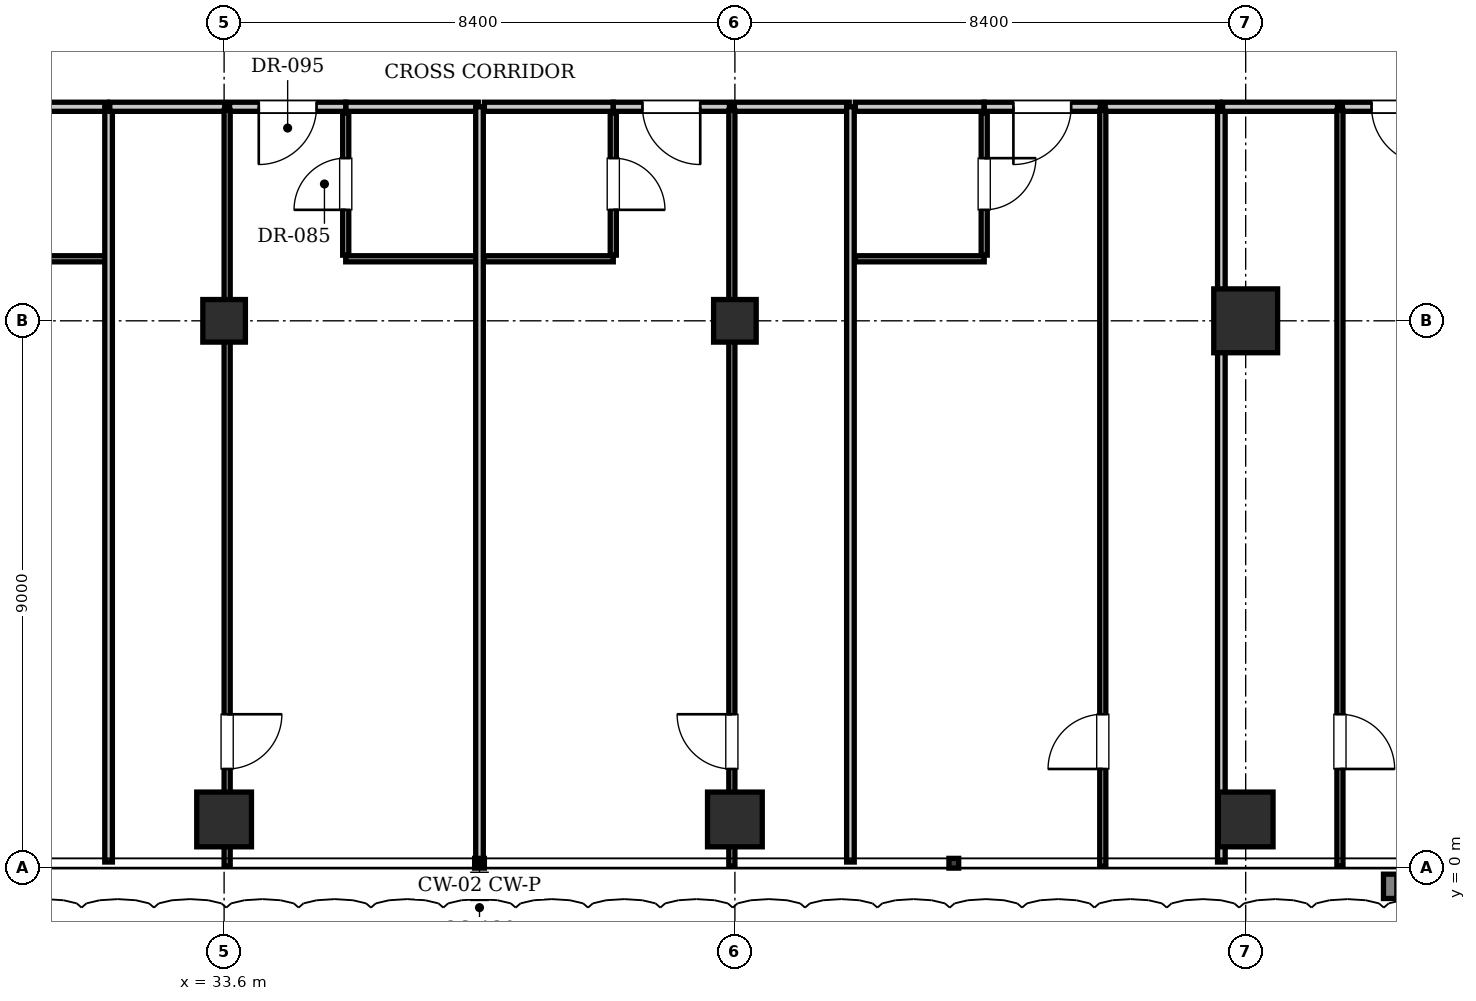
"""IFC4 building model, lengths in metres.
Left out: names, types, materials, properties, quantities, classifications, styles, units other than length and angle.
Written with IfcOpenShell. Run it as: python <this file> out.ifc"""

import sys

from ifc_helpers import new_model, si_unit, direction, frame, frame_2d, origin, origin_2d, place, context, subcontext, project, spatial, rectangle, i_section, extrude, element, fill, save


model = new_model("IFC4")
c1 = context("Model", 3, precision=1e-05, world=origin(), true_north=direction((0.0, 1.0)))
c2 = subcontext(c1, "Body", "Model", "MODEL_VIEW")
j1 = project(units=[si_unit("LENGTHUNIT", "METRE"), si_unit("PLANEANGLEUNIT", "RADIAN")], contexts=[c1])
p1 = place(None, origin())
s1 = spatial("IfcSite", under=j1, at=p1, CompositionType="ELEMENT")
p2 = place(p1, origin())
s2 = spatial("IfcBuilding", under=s1, at=p2, CompositionType="ELEMENT")
p3 = place(p2, frame((0.0, 0.0, 38.5)))
s3 = spatial("IfcBuildingStorey", under=s2, at=p3, CompositionType="ELEMENT", Elevation=38.5)
p4 = place(p3, frame((50.4, 9.0, 0.0), z_axis=(0.0, 0.0, 1.0), x_axis=(1.0, 0.0, 0.0)))
e1 = element("IfcColumn", 1, at=p4, inside=s3, PredefinedType="COLUMN", context=c2, shape_type="SweptSolid", body=[
    extrude(rectangle(XDim=1.05, YDim=1.05, at=origin_2d()), origin(), (0.0, 0.0, 1.0), 3.85),
])
for number, where, z_axis, x_axis in (
    (2, (33.6, 9.0, 0.0), (0.0, 0.0, 1.0), (1.0, 0.0, 0.0)),
    (3, (42.0, 9.0, 0.0), (0.0, 0.0, 1.0), (1.0, 0.0, 0.0)),
):
    element("IfcColumn", number, at=place(p3, frame(where, z_axis=z_axis, x_axis=x_axis)), inside=s3, PredefinedType="COLUMN", context=c2, shape_type="SweptSolid", body=[
        extrude(i_section(OverallWidth=0.7, OverallDepth=0.7, WebThickness=0.028, FlangeThickness=0.044, at=origin_2d()), origin(), (0.0, 0.0, 1.0), 3.85),
    ])
for number, where, z_axis, x_axis in (
    (4, (33.6, 0.8, 0.0), (0.0, 0.0, 1.0), (1.0, 0.0, 0.0)),
    (5, (42.0, 0.8, 0.0), (0.0, 0.0, 1.0), (1.0, 0.0, 0.0)),
    (6, (50.4, 0.8, 0.0), (0.0, 0.0, 1.0), (1.0, 0.0, 0.0)),
):
    element("IfcColumn", number, at=place(p3, frame(where, z_axis=z_axis, x_axis=x_axis)), inside=s3, PredefinedType="COLUMN", context=c2, shape_type="SweptSolid", body=[
        extrude(rectangle(XDim=0.9, YDim=0.9, at=origin_2d()), origin(), (0.0, 0.0, 1.0), 3.85),
    ])
p5 = place(p3, frame((29.5, 12.52, 0.0), z_axis=(0.0, 0.0, 1.0), x_axis=(1.0, 0.0, 0.0)))
e7 = element("IfcWall", 7, at=p5, inside=s3, PredefinedType="PARTITIONING", context=c2, shape_type="SweptSolid", body=[
    extrude(rectangle(XDim=2.18, YDim=0.15, at=frame_2d((1.09, 0.0))), origin(), (0.0, 0.0, 1.0), 3.61),
])
p6 = place(p3, frame((29.5, 10.02, 0.0), z_axis=(0.0, 0.0, 1.0), x_axis=(1.0, 0.0, 0.0)))
e8 = element("IfcWall", 8, at=p6, inside=s3, PredefinedType="PARTITIONING", context=c2, shape_type="SweptSolid", body=[
    extrude(rectangle(XDim=2.16, YDim=0.1, at=frame_2d((1.08, 0.0))), origin(), (0.0, 0.0, 1.0), 3.61),
])
p7 = place(p3, frame((31.7, 0.1, 0.0), z_axis=(0.0, 0.0, 1.0), x_axis=(0.0, 1.0, 0.0)))
e9 = element("IfcWall", 9, at=p7, inside=s3, PredefinedType="PARTITIONING", context=c2, shape_type="SweptSolid", body=[
    extrude(rectangle(XDim=12.42, YDim=0.125, at=frame_2d((6.21, 0.0))), origin(), (0.0, 0.0, 1.0), 3.61),
])
p8 = place(p3, frame((35.6, 12.52, 0.0), z_axis=(0.0, 0.0, 1.0), x_axis=(1.0, 0.0, 0.0)))
e10 = element("IfcWall", 10, at=p8, inside=s3, PredefinedType="PARTITIONING", context=c2, shape_type="SweptSolid", body=[
    extrude(rectangle(XDim=2.18, YDim=0.15, at=frame_2d((1.09, 0.0))), origin(), (0.0, 0.0, 1.0), 3.61),
])
p9 = place(p3, frame((35.6, 10.02, 0.0), z_axis=(0.0, 0.0, 1.0), x_axis=(1.0, 0.0, 0.0)))
e11 = element("IfcWall", 11, at=p9, inside=s3, PredefinedType="PARTITIONING", context=c2, shape_type="SweptSolid", body=[
    extrude(rectangle(XDim=2.16, YDim=0.1, at=frame_2d((1.08, 0.0))), origin(), (0.0, 0.0, 1.0), 3.61),
])
p10 = place(p3, frame((35.6, 10.08, 0.0), z_axis=(0.0, 0.0, 1.0), x_axis=(0.0, 1.0, 0.0)))
e12 = element("IfcWall", 12, at=p10, inside=s3, PredefinedType="PARTITIONING", context=c2, shape_type="SweptSolid", body=[
    extrude(rectangle(XDim=2.34, YDim=0.1, at=frame_2d((1.17, 0.0))), origin(), (0.0, 0.0, 1.0), 3.61),
])
p11 = place(p10, frame((0.745, 0.0, 0.0)))
e13 = element("IfcOpeningElement", 13, at=p11, cuts=e12, PredefinedType="OPENING", context=c2, shape_type="SweptSolid", body=[
    extrude(rectangle(XDim=0.85, YDim=2.1, at=frame_2d((0.425, 1.05))), frame((0.0, 0.06, 0.0), z_axis=(0.0, -1.0, 0.0), x_axis=(1.0, 0.0, 0.0)), (0.0, 0.0, 1.0), 0.12),
])
p12 = place(p3, frame((31.72, 12.52, 0.0), z_axis=(0.0, 0.0, 1.0), x_axis=(1.0, 0.0, 0.0)))
e14 = element("IfcWall", 14, at=p12, inside=s3, PredefinedType="PARTITIONING", context=c2, shape_type="SweptSolid", body=[
    extrude(rectangle(XDim=1.89, YDim=0.15, at=frame_2d((0.945, 0.0))), origin(), (0.0, 0.0, 1.0), 3.61),
])
p13 = place(p3, frame((33.69, 12.52, 0.0), z_axis=(0.0, 0.0, 1.0), x_axis=(1.0, 0.0, 0.0)))
e15 = element("IfcWall", 15, at=p13, inside=s3, PredefinedType="PARTITIONING", context=c2, shape_type="SweptSolid", body=[
    extrude(rectangle(XDim=1.91, YDim=0.15, at=frame_2d((0.955, 0.0))), origin(), (0.0, 0.0, 1.0), 3.61),
])
p14 = place(p13, frame((0.48, 0.0, 0.0)))
e16 = element("IfcOpeningElement", 16, at=p14, cuts=e15, PredefinedType="OPENING", context=c2, shape_type="SweptSolid", body=[
    extrude(rectangle(XDim=0.95, YDim=2.15, at=frame_2d((0.475, 1.075))), frame((0.0, 0.085, 0.0), z_axis=(0.0, -1.0, 0.0), x_axis=(1.0, 0.0, 0.0)), (0.0, 0.0, 1.0), 0.17),
])
p15 = place(p3, frame((33.65, 0.03, 0.0), z_axis=(0.0, 0.0, 1.0), x_axis=(0.0, 1.0, 0.0)))
e17 = element("IfcWall", 17, at=p15, inside=s3, PredefinedType="PARTITIONING", context=c2, shape_type="SweptSolid", body=[
    extrude(rectangle(XDim=12.43, YDim=0.1, at=frame_2d((6.215, 0.0))), origin(), (0.0, 0.0, 1.0), 2.988),
])
p16 = place(p15, frame((1.6, 0.0, 0.0)))
e18 = element("IfcOpeningElement", 18, at=p16, cuts=e17, PredefinedType="OPENING", context=c2, shape_type="SweptSolid", body=[
    extrude(rectangle(XDim=0.9, YDim=2.1, at=frame_2d((0.45, 1.05))), frame((0.0, 0.06, 0.0), z_axis=(0.0, -1.0, 0.0), x_axis=(1.0, 0.0, 0.0)), (0.0, 0.0, 1.0), 0.12),
])
p17 = place(p3, frame((37.8, 0.1, 0.0), z_axis=(0.0, 0.0, 1.0), x_axis=(0.0, 1.0, 0.0)))
e19 = element("IfcWall", 19, at=p17, inside=s3, PredefinedType="PARTITIONING", context=c2, shape_type="SweptSolid", body=[
    extrude(rectangle(XDim=12.42, YDim=0.125, at=frame_2d((6.21, 0.0))), origin(), (0.0, 0.0, 1.0), 3.255),
])
p18 = place(p3, frame((37.88, 12.52, 0.0), z_axis=(0.0, 0.0, 1.0), x_axis=(1.0, 0.0, 0.0)))
e20 = element("IfcWall", 20, at=p18, inside=s3, PredefinedType="PARTITIONING", context=c2, shape_type="SweptSolid", body=[
    extrude(rectangle(XDim=2.12, YDim=0.15, at=frame_2d((1.06, 0.0))), origin(), (0.0, 0.0, 1.0), 3.61),
])
p19 = place(p3, frame((37.88, 10.02, 0.0), z_axis=(0.0, 0.0, 1.0), x_axis=(1.0, 0.0, 0.0)))
e21 = element("IfcWall", 21, at=p19, inside=s3, PredefinedType="PARTITIONING", context=c2, shape_type="SweptSolid", body=[
    extrude(rectangle(XDim=2.12, YDim=0.1, at=frame_2d((1.06, 0.0))), origin(), (0.0, 0.0, 1.0), 3.61),
])
p20 = place(p3, frame((40.0, 10.08, 0.0), z_axis=(0.0, 0.0, 1.0), x_axis=(0.0, 1.0, 0.0)))
e22 = element("IfcWall", 22, at=p20, inside=s3, PredefinedType="PARTITIONING", context=c2, shape_type="SweptSolid", body=[
    extrude(rectangle(XDim=2.34, YDim=0.1, at=frame_2d((1.17, 0.0))), origin(), (0.0, 0.0, 1.0), 3.61),
])
p21 = place(p20, frame((0.745, 0.0, 0.0)))
e23 = element("IfcOpeningElement", 23, at=p21, cuts=e22, PredefinedType="OPENING", context=c2, shape_type="SweptSolid", body=[
    extrude(rectangle(XDim=0.85, YDim=2.1, at=frame_2d((0.425, 1.05))), frame((0.0, 0.06, 0.0), z_axis=(0.0, -1.0, 0.0), x_axis=(1.0, 0.0, 0.0)), (0.0, 0.0, 1.0), 0.12),
])
p22 = place(p3, frame((40.0, 12.52, 0.0), z_axis=(0.0, 0.0, 1.0), x_axis=(1.0, 0.0, 0.0)))
e24 = element("IfcWall", 24, at=p22, inside=s3, PredefinedType="PARTITIONING", context=c2, shape_type="SweptSolid", body=[
    extrude(rectangle(XDim=1.91, YDim=0.15, at=frame_2d((0.955, 0.0))), origin(), (0.0, 0.0, 1.0), 3.61),
])
p23 = place(p22, frame((0.48, 0.0, 0.0)))
e25 = element("IfcOpeningElement", 25, at=p23, cuts=e24, PredefinedType="OPENING", context=c2, shape_type="SweptSolid", body=[
    extrude(rectangle(XDim=0.95, YDim=2.15, at=frame_2d((0.475, 1.075))), frame((0.0, 0.085, 0.0), z_axis=(0.0, -1.0, 0.0), x_axis=(1.0, 0.0, 0.0)), (0.0, 0.0, 1.0), 0.17),
])
p24 = place(p3, frame((41.99, 12.52, 0.0), z_axis=(0.0, 0.0, 1.0), x_axis=(1.0, 0.0, 0.0)))
e26 = element("IfcWall", 26, at=p24, inside=s3, PredefinedType="PARTITIONING", context=c2, shape_type="SweptSolid", body=[
    extrude(rectangle(XDim=1.89, YDim=0.15, at=frame_2d((0.945, 0.0))), origin(), (0.0, 0.0, 1.0), 3.61),
])
p25 = place(p3, frame((41.95, 0.03, 0.0), z_axis=(0.0, 0.0, 1.0), x_axis=(0.0, 1.0, 0.0)))
e27 = element("IfcWall", 27, at=p25, inside=s3, PredefinedType="PARTITIONING", context=c2, shape_type="SweptSolid", body=[
    extrude(rectangle(XDim=12.43, YDim=0.1, at=frame_2d((6.215, 0.0))), origin(), (0.0, 0.0, 1.0), 2.988),
])
p26 = place(p25, frame((1.6, 0.0, 0.0)))
e28 = element("IfcOpeningElement", 28, at=p26, cuts=e27, PredefinedType="OPENING", context=c2, shape_type="SweptSolid", body=[
    extrude(rectangle(XDim=0.9, YDim=2.1, at=frame_2d((0.45, 1.05))), frame((0.0, 0.06, 0.0), z_axis=(0.0, -1.0, 0.0), x_axis=(1.0, 0.0, 0.0)), (0.0, 0.0, 1.0), 0.12),
])
p27 = place(p3, frame((43.9, 0.1, 0.0), z_axis=(0.0, 0.0, 1.0), x_axis=(0.0, 1.0, 0.0)))
e29 = element("IfcWall", 29, at=p27, inside=s3, PredefinedType="PARTITIONING", context=c2, shape_type="SweptSolid", body=[
    extrude(rectangle(XDim=12.42, YDim=0.125, at=frame_2d((6.21, 0.0))), origin(), (0.0, 0.0, 1.0), 3.61),
])
p28 = place(p3, frame((43.98, 12.52, 0.0), z_axis=(0.0, 0.0, 1.0), x_axis=(1.0, 0.0, 0.0)))
e30 = element("IfcWall", 30, at=p28, inside=s3, PredefinedType="PARTITIONING", context=c2, shape_type="SweptSolid", body=[
    extrude(rectangle(XDim=2.12, YDim=0.15, at=frame_2d((1.06, 0.0))), origin(), (0.0, 0.0, 1.0), 3.61),
])
p29 = place(p3, frame((43.98, 10.02, 0.0), z_axis=(0.0, 0.0, 1.0), x_axis=(1.0, 0.0, 0.0)))
e31 = element("IfcWall", 31, at=p29, inside=s3, PredefinedType="PARTITIONING", context=c2, shape_type="SweptSolid", body=[
    extrude(rectangle(XDim=2.12, YDim=0.1, at=frame_2d((1.06, 0.0))), origin(), (0.0, 0.0, 1.0), 3.61),
])
p30 = place(p3, frame((46.1, 10.08, 0.0), z_axis=(0.0, 0.0, 1.0), x_axis=(0.0, 1.0, 0.0)))
e32 = element("IfcWall", 32, at=p30, inside=s3, PredefinedType="PARTITIONING", context=c2, shape_type="SweptSolid", body=[
    extrude(rectangle(XDim=2.34, YDim=0.1, at=frame_2d((1.17, 0.0))), origin(), (0.0, 0.0, 1.0), 3.293),
])
p31 = place(p30, frame((0.745, 0.0, 0.0)))
e33 = element("IfcOpeningElement", 33, at=p31, cuts=e32, PredefinedType="OPENING", context=c2, shape_type="SweptSolid", body=[
    extrude(rectangle(XDim=0.85, YDim=2.1, at=frame_2d((0.425, 1.05))), frame((0.0, 0.06, 0.0), z_axis=(0.0, -1.0, 0.0), x_axis=(1.0, 0.0, 0.0)), (0.0, 0.0, 1.0), 0.12),
])
p32 = place(p3, frame((46.1, 12.52, 0.0), z_axis=(0.0, 0.0, 1.0), x_axis=(1.0, 0.0, 0.0)))
e34 = element("IfcWall", 34, at=p32, inside=s3, PredefinedType="PARTITIONING", context=c2, shape_type="SweptSolid", body=[
    extrude(rectangle(XDim=1.91, YDim=0.15, at=frame_2d((0.955, 0.0))), origin(), (0.0, 0.0, 1.0), 3.61),
])
p33 = place(p32, frame((0.48, 0.0, 0.0)))
e35 = element("IfcOpeningElement", 35, at=p33, cuts=e34, PredefinedType="OPENING", context=c2, shape_type="SweptSolid", body=[
    extrude(rectangle(XDim=0.95, YDim=2.15, at=frame_2d((0.475, 1.075))), frame((0.0, 0.085, 0.0), z_axis=(0.0, -1.0, 0.0), x_axis=(1.0, 0.0, 0.0)), (0.0, 0.0, 1.0), 0.17),
])
p34 = place(p3, frame((48.09, 12.52, 0.0), z_axis=(0.0, 0.0, 1.0), x_axis=(1.0, 0.0, 0.0)))
e36 = element("IfcWall", 36, at=p34, inside=s3, PredefinedType="PARTITIONING", context=c2, shape_type="SweptSolid", body=[
    extrude(rectangle(XDim=1.89, YDim=0.15, at=frame_2d((0.945, 0.0))), origin(), (0.0, 0.0, 1.0), 3.61),
])
p35 = place(p3, frame((48.05, 0.03, 0.0), z_axis=(0.0, 0.0, 1.0), x_axis=(0.0, 1.0, 0.0)))
e37 = element("IfcWall", 37, at=p35, inside=s3, PredefinedType="PARTITIONING", context=c2, shape_type="SweptSolid", body=[
    extrude(rectangle(XDim=12.43, YDim=0.1, at=frame_2d((6.215, 0.0))), origin(), (0.0, 0.0, 1.0), 3.61),
])
p36 = place(p35, frame((1.6, 0.0, 0.0)))
e38 = element("IfcOpeningElement", 38, at=p36, cuts=e37, PredefinedType="OPENING", context=c2, shape_type="SweptSolid", body=[
    extrude(rectangle(XDim=0.9, YDim=2.1, at=frame_2d((0.45, 1.05))), frame((0.0, 0.06, 0.0), z_axis=(0.0, -1.0, 0.0), x_axis=(1.0, 0.0, 0.0)), (0.0, 0.0, 1.0), 0.12),
])
p37 = place(p3, frame((50.0, 0.1, 0.0), z_axis=(0.0, 0.0, 1.0), x_axis=(0.0, 1.0, 0.0)))
e39 = element("IfcWall", 39, at=p37, inside=s3, PredefinedType="PARTITIONING", context=c2, shape_type="SweptSolid", body=[
    extrude(rectangle(XDim=12.42, YDim=0.125, at=frame_2d((6.21, 0.0))), origin(), (0.0, 0.0, 1.0), 3.61),
])
p38 = place(p3, frame((50.02, 12.52, 0.0), z_axis=(0.0, 0.0, 1.0), x_axis=(1.0, 0.0, 0.0)))
e40 = element("IfcWall", 40, at=p38, inside=s3, PredefinedType="PARTITIONING", context=c2, shape_type="SweptSolid", body=[
    extrude(rectangle(XDim=1.89, YDim=0.15, at=frame_2d((0.945, 0.0))), origin(), (0.0, 0.0, 1.0), 3.61),
])
p39 = place(p3, frame((51.99, 12.52, 0.0), z_axis=(0.0, 0.0, 1.0), x_axis=(1.0, 0.0, 0.0)))
e41 = element("IfcWall", 41, at=p39, inside=s3, PredefinedType="PARTITIONING", context=c2, shape_type="SweptSolid", body=[
    extrude(rectangle(XDim=1.91, YDim=0.15, at=frame_2d((0.955, 0.0))), origin(), (0.0, 0.0, 1.0), 3.61),
])
p40 = place(p39, frame((0.48, 0.0, 0.0)))
e42 = element("IfcOpeningElement", 42, at=p40, cuts=e41, PredefinedType="OPENING", context=c2, shape_type="SweptSolid", body=[
    extrude(rectangle(XDim=0.95, YDim=2.15, at=frame_2d((0.475, 1.075))), frame((0.0, 0.085, 0.0), z_axis=(0.0, -1.0, 0.0), x_axis=(1.0, 0.0, 0.0)), (0.0, 0.0, 1.0), 0.17),
])
p41 = place(p3, frame((51.95, 0.03, 0.0), z_axis=(0.0, 0.0, 1.0), x_axis=(0.0, 1.0, 0.0)))
e43 = element("IfcWall", 43, at=p41, inside=s3, PredefinedType="PARTITIONING", context=c2, shape_type="SweptSolid", body=[
    extrude(rectangle(XDim=12.43, YDim=0.1, at=frame_2d((6.215, 0.0))), origin(), (0.0, 0.0, 1.0), 3.61),
])
p42 = place(p41, frame((1.6, 0.0, 0.0)))
e44 = element("IfcOpeningElement", 44, at=p42, cuts=e43, PredefinedType="OPENING", context=c2, shape_type="SweptSolid", body=[
    extrude(rectangle(XDim=0.9, YDim=2.1, at=frame_2d((0.45, 1.05))), frame((0.0, 0.06, 0.0), z_axis=(0.0, -1.0, 0.0), x_axis=(1.0, 0.0, 0.0)), (0.0, 0.0, 1.0), 0.12),
])
p43 = place(p11, origin())
e45 = element("IfcDoor", 45, at=p43, inside=s3, OperationType="SINGLE_SWING_LEFT", PredefinedType="DOOR", context=c2, shape_type="SweptSolid", body=[
    extrude(rectangle(XDim=0.85, YDim=2.1, at=frame_2d((0.425, 1.05))), frame((0.0, 0.025, 0.0), z_axis=(0.0, -1.0, 0.0), x_axis=(1.0, 0.0, 0.0)), (0.0, 0.0, 1.0), 0.05),
])
fill(e13, e45)
p44 = place(p14, frame((0.95, 0.0, 0.0), z_axis=(0.0, 0.0, 1.0), x_axis=(-1.0, 0.0, 0.0)))
e46 = element("IfcDoor", 46, at=p44, inside=s3, OperationType="SINGLE_SWING_RIGHT", PredefinedType="DOOR", context=c2, shape_type="SweptSolid", body=[
    extrude(rectangle(XDim=0.95, YDim=2.15, at=frame_2d((0.475, 1.075))), frame((0.0, 0.025, 0.0), z_axis=(0.0, -1.0, 0.0), x_axis=(1.0, 0.0, 0.0)), (0.0, 0.0, 1.0), 0.05),
])
fill(e16, e46)
p45 = place(p16, frame((0.9, 0.0, 0.0), z_axis=(0.0, 0.0, 1.0), x_axis=(-1.0, 0.0, 0.0)))
e47 = element("IfcDoor", 47, at=p45, inside=s3, OperationType="SINGLE_SWING_LEFT", PredefinedType="DOOR", context=c2, shape_type="SweptSolid", body=[
    extrude(rectangle(XDim=0.9, YDim=2.1, at=frame_2d((0.45, 1.05))), frame((0.0, 0.025, 0.0), z_axis=(0.0, -1.0, 0.0), x_axis=(1.0, 0.0, 0.0)), (0.0, 0.0, 1.0), 0.05),
])
fill(e18, e47)
p46 = place(p21, frame((0.85, 0.0, 0.0), z_axis=(0.0, 0.0, 1.0), x_axis=(-1.0, 0.0, 0.0)))
e48 = element("IfcDoor", 48, at=p46, inside=s3, OperationType="SINGLE_SWING_RIGHT", PredefinedType="DOOR", context=c2, shape_type="SweptSolid", body=[
    extrude(rectangle(XDim=0.85, YDim=2.1, at=frame_2d((0.425, 1.05))), frame((0.0, 0.025, 0.0), z_axis=(0.0, -1.0, 0.0), x_axis=(1.0, 0.0, 0.0)), (0.0, 0.0, 1.0), 0.05),
])
fill(e23, e48)
p47 = place(p23, frame((0.95, 0.0, 0.0), z_axis=(0.0, 0.0, 1.0), x_axis=(-1.0, 0.0, 0.0)))
e49 = element("IfcDoor", 49, at=p47, inside=s3, OperationType="SINGLE_SWING_LEFT", PredefinedType="DOOR", context=c2, shape_type="SweptSolid", body=[
    extrude(rectangle(XDim=0.95, YDim=2.15, at=frame_2d((0.475, 1.075))), frame((0.0, 0.025, 0.0), z_axis=(0.0, -1.0, 0.0), x_axis=(1.0, 0.0, 0.0)), (0.0, 0.0, 1.0), 0.05),
])
fill(e25, e49)
p48 = place(p26, origin())
e50 = element("IfcDoor", 50, at=p48, inside=s3, OperationType="SINGLE_SWING_RIGHT", PredefinedType="DOOR", context=c2, shape_type="SweptSolid", body=[
    extrude(rectangle(XDim=0.9, YDim=2.1, at=frame_2d((0.45, 1.05))), frame((0.0, 0.025, 0.0), z_axis=(0.0, -1.0, 0.0), x_axis=(1.0, 0.0, 0.0)), (0.0, 0.0, 1.0), 0.05),
])
fill(e28, e50)
p49 = place(p31, frame((0.85, 0.0, 0.0), z_axis=(0.0, 0.0, 1.0), x_axis=(-1.0, 0.0, 0.0)))
e51 = element("IfcDoor", 51, at=p49, inside=s3, OperationType="SINGLE_SWING_LEFT", PredefinedType="DOOR", context=c2, shape_type="SweptSolid", body=[
    extrude(rectangle(XDim=0.85, YDim=2.1, at=frame_2d((0.425, 1.05))), frame((0.0, 0.025, 0.0), z_axis=(0.0, -1.0, 0.0), x_axis=(1.0, 0.0, 0.0)), (0.0, 0.0, 1.0), 0.05),
])
fill(e33, e51)
p50 = place(p33, frame((0.95, 0.0, 0.0), z_axis=(0.0, 0.0, 1.0), x_axis=(-1.0, 0.0, 0.0)))
e52 = element("IfcDoor", 52, at=p50, inside=s3, OperationType="SINGLE_SWING_RIGHT", PredefinedType="DOOR", context=c2, shape_type="SweptSolid", body=[
    extrude(rectangle(XDim=0.95, YDim=2.15, at=frame_2d((0.475, 1.075))), frame((0.0, 0.025, 0.0), z_axis=(0.0, -1.0, 0.0), x_axis=(1.0, 0.0, 0.0)), (0.0, 0.0, 1.0), 0.05),
])
fill(e35, e52)
p51 = place(p36, origin())
e53 = element("IfcDoor", 53, at=p51, inside=s3, OperationType="SINGLE_SWING_LEFT", PredefinedType="DOOR", context=c2, shape_type="SweptSolid", body=[
    extrude(rectangle(XDim=0.9, YDim=2.1, at=frame_2d((0.45, 1.05))), frame((0.0, 0.025, 0.0), z_axis=(0.0, -1.0, 0.0), x_axis=(1.0, 0.0, 0.0)), (0.0, 0.0, 1.0), 0.05),
])
fill(e38, e53)
p52 = place(p40, frame((0.95, 0.0, 0.0), z_axis=(0.0, 0.0, 1.0), x_axis=(-1.0, 0.0, 0.0)))
e54 = element("IfcDoor", 54, at=p52, inside=s3, OperationType="SINGLE_SWING_LEFT", PredefinedType="DOOR", context=c2, shape_type="SweptSolid", body=[
    extrude(rectangle(XDim=0.95, YDim=2.15, at=frame_2d((0.475, 1.075))), frame((0.0, 0.025, 0.0), z_axis=(0.0, -1.0, 0.0), x_axis=(1.0, 0.0, 0.0)), (0.0, 0.0, 1.0), 0.05),
])
fill(e42, e54)
p53 = place(p42, frame((0.9, 0.0, 0.0), z_axis=(0.0, 0.0, 1.0), x_axis=(-1.0, 0.0, 0.0)))
e55 = element("IfcDoor", 55, at=p53, inside=s3, OperationType="SINGLE_SWING_RIGHT", PredefinedType="DOOR", context=c2, shape_type="SweptSolid", body=[
    extrude(rectangle(XDim=0.9, YDim=2.1, at=frame_2d((0.45, 1.05))), frame((0.0, 0.025, 0.0), z_axis=(0.0, -1.0, 0.0), x_axis=(1.0, 0.0, 0.0)), (0.0, 0.0, 1.0), 0.05),
])
fill(e44, e55)
save(model, sys.argv[1])
